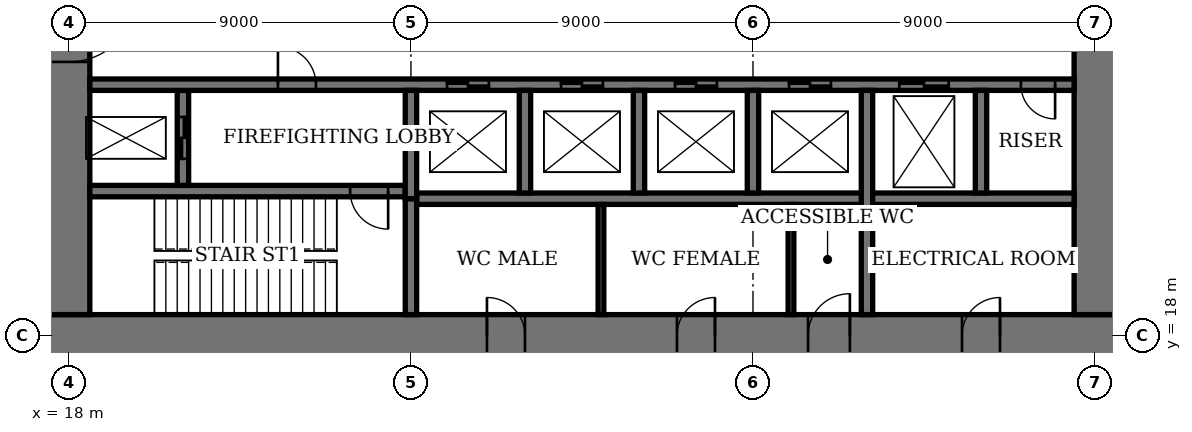
"""IFC4 building model, lengths in metres.
Left out: names, types, materials, properties, quantities, classifications, styles, units other than length and angle.
Written with IfcOpenShell. Run it as: python <this file> out.ifc"""

import sys

from ifc_helpers import new_model, si_unit, direction, frame, frame_2d, origin, place, context, subcontext, project, spatial, rectangle, extrude, element, fill, save


model = new_model("IFC4")
c1 = context("Model", 3, precision=1e-05, world=origin(), true_north=direction((0.0, 1.0)))
c2 = subcontext(c1, "Body", "Model", "MODEL_VIEW")
j1 = project(units=[si_unit("LENGTHUNIT", "METRE"), si_unit("PLANEANGLEUNIT", "RADIAN")], contexts=[c1])
p1 = place(None, origin())
s1 = spatial("IfcSite", under=j1, at=p1, CompositionType="ELEMENT")
p2 = place(p1, origin())
s2 = spatial("IfcBuilding", under=s1, at=p2, CompositionType="ELEMENT")
p3 = place(p2, frame((0.0, 0.0, -5.0)))
s3 = spatial("IfcBuildingStorey", under=s2, at=p3, CompositionType="ELEMENT", Elevation=-5.0)
p4 = place(p3, frame((17.45, 18.0, 0.0), z_axis=(0.0, 0.0, 1.0), x_axis=(1.0, 0.0, 0.0)))
e1 = element("IfcWall", 1, at=p4, inside=s3, PredefinedType="SHEAR", context=c2, shape_type="SweptSolid", body=[
    extrude(rectangle(XDim=28.1, YDim=1.1, at=frame_2d((14.05, 0.0))), origin(), (0.0, 0.0, 1.0), 5.0),
])
p5 = place(p4, frame((11.55, 0.0, 0.0)))
e2 = element("IfcOpeningElement", 2, at=p5, cuts=e1, PredefinedType="OPENING", context=c2, shape_type="SweptSolid", body=[
    extrude(rectangle(XDim=1.0, YDim=2.4, at=frame_2d((0.5, 1.2))), frame((0.0, 0.56, 0.0), z_axis=(0.0, -1.0, 0.0), x_axis=(1.0, 0.0, 0.0)), (0.0, 0.0, 1.0), 1.12),
])
p6 = place(p4, frame((16.55, 0.0, 0.0)))
e3 = element("IfcOpeningElement", 3, at=p6, cuts=e1, PredefinedType="OPENING", context=c2, shape_type="SweptSolid", body=[
    extrude(rectangle(XDim=1.0, YDim=2.4, at=frame_2d((0.5, 1.2))), frame((0.0, 0.56, 0.0), z_axis=(0.0, -1.0, 0.0), x_axis=(1.0, 0.0, 0.0)), (0.0, 0.0, 1.0), 1.12),
])
p7 = place(p4, frame((20.0, 0.0, 0.0)))
e4 = element("IfcOpeningElement", 4, at=p7, cuts=e1, PredefinedType="OPENING", context=c2, shape_type="SweptSolid", body=[
    extrude(rectangle(XDim=1.1, YDim=2.4, at=frame_2d((0.55, 1.2))), frame((0.0, 0.56, 0.0), z_axis=(0.0, -1.0, 0.0), x_axis=(1.0, 0.0, 0.0)), (0.0, 0.0, 1.0), 1.12),
])
p8 = place(p4, frame((24.05, 0.0, 0.0)))
e5 = element("IfcOpeningElement", 5, at=p8, cuts=e1, PredefinedType="OPENING", context=c2, shape_type="SweptSolid", body=[
    extrude(rectangle(XDim=1.0, YDim=2.4, at=frame_2d((0.5, 1.2))), frame((0.0, 0.56, 0.0), z_axis=(0.0, -1.0, 0.0), x_axis=(1.0, 0.0, 0.0)), (0.0, 0.0, 1.0), 1.12),
])
p9 = place(p3, frame((18.0, 35.45, 0.0), z_axis=(0.0, 0.0, 1.0), x_axis=(0.0, -1.0, 0.0)))
e6 = element("IfcWall", 6, at=p9, inside=s3, PredefinedType="SHEAR", context=c2, shape_type="SweptSolid", body=[
    extrude(rectangle(XDim=16.9, YDim=1.1, at=frame_2d((8.45, 0.0))), origin(), (0.0, 0.0, 1.0), 5.0),
])
p10 = place(p9, frame((8.45, 0.0, 0.0)))
e7 = element("IfcOpeningElement", 7, at=p10, cuts=e6, PredefinedType="OPENING", context=c2, shape_type="SweptSolid", body=[
    extrude(rectangle(XDim=1.8, YDim=2.4, at=frame_2d((0.9, 1.2))), frame((0.0, 0.56, 0.0), z_axis=(0.0, -1.0, 0.0), x_axis=(1.0, 0.0, 0.0)), (0.0, 0.0, 1.0), 1.12),
])
p11 = place(p3, frame((45.0, 18.55, 0.0), z_axis=(0.0, 0.0, 1.0), x_axis=(0.0, 1.0, 0.0)))
e8 = element("IfcWall", 8, at=p11, inside=s3, PredefinedType="SHEAR", context=c2, shape_type="SweptSolid", body=[
    extrude(rectangle(XDim=16.9, YDim=1.1, at=frame_2d((8.45, 0.0))), origin(), (0.0, 0.0, 1.0), 5.0),
])
p12 = place(p11, frame((8.45, 0.0, 0.0)))
e9 = element("IfcOpeningElement", 9, at=p12, cuts=e8, PredefinedType="OPENING", context=c2, shape_type="SweptSolid", body=[
    extrude(rectangle(XDim=1.8, YDim=2.4, at=frame_2d((0.9, 1.2))), frame((0.0, 0.56, 0.0), z_axis=(0.0, -1.0, 0.0), x_axis=(1.0, 0.0, 0.0)), (0.0, 0.0, 1.0), 1.12),
])
p13 = place(p3, frame((18.55, 21.8, 0.0), z_axis=(0.0, 0.0, 1.0), x_axis=(1.0, 0.0, 0.0)))
e10 = element("IfcWall", 10, at=p13, inside=s3, PredefinedType="SHEAR", context=c2, shape_type="SweptSolid", body=[
    extrude(rectangle(XDim=8.3, YDim=0.3, at=frame_2d((4.15, 0.0))), origin(), (0.0, 0.0, 1.0), 5.0),
])
p14 = place(p13, frame((6.85, 0.0, 0.0)))
e11 = element("IfcOpeningElement", 11, at=p14, cuts=e10, PredefinedType="OPENING", context=c2, shape_type="SweptSolid", body=[
    extrude(rectangle(XDim=1.0, YDim=2.4, at=frame_2d((0.5, 1.2))), frame((0.0, 0.16, 0.0), z_axis=(0.0, -1.0, 0.0), x_axis=(1.0, 0.0, 0.0)), (0.0, 0.0, 1.0), 0.32),
])
p15 = place(p3, frame((27.0, 18.55, 0.0), z_axis=(0.0, 0.0, 1.0), x_axis=(0.0, 1.0, 0.0)))
e12 = element("IfcWall", 12, at=p15, inside=s3, PredefinedType="SHEAR", context=c2, shape_type="SweptSolid", body=[
    extrude(rectangle(XDim=3.05, YDim=0.3, at=frame_2d((1.525, 0.0))), origin(), (0.0, 0.0, 1.0), 5.0),
])
p16 = place(p3, frame((21.0, 21.95, 0.0), z_axis=(0.0, 0.0, 1.0), x_axis=(0.0, 1.0, 0.0)))
e13 = element("IfcWall", 13, at=p16, inside=s3, PredefinedType="SHEAR", context=c2, shape_type="SweptSolid", body=[
    extrude(rectangle(XDim=2.5, YDim=0.3, at=frame_2d((1.25, 0.0))), origin(), (0.0, 0.0, 1.0), 5.0),
])
p17 = place(p16, frame((0.7, 0.0, 0.0)))
e14 = element("IfcOpeningElement", 14, at=p17, cuts=e13, PredefinedType="OPENING", context=c2, shape_type="SweptSolid", body=[
    extrude(rectangle(XDim=1.1, YDim=2.4, at=frame_2d((0.55, 1.2))), frame((0.0, 0.16, 0.0), z_axis=(0.0, -1.0, 0.0), x_axis=(1.0, 0.0, 0.0)), (0.0, 0.0, 1.0), 0.32),
])
p18 = place(p3, frame((18.55, 24.6, 0.0), z_axis=(0.0, 0.0, 1.0), x_axis=(1.0, 0.0, 0.0)))
e15 = element("IfcWall", 15, at=p18, inside=s3, PredefinedType="SHEAR", context=c2, shape_type="SweptSolid", body=[
    extrude(rectangle(XDim=25.9, YDim=0.3, at=frame_2d((12.95, 0.0))), origin(), (0.0, 0.0, 1.0), 5.0),
])
p19 = place(p18, frame((4.95, 0.0, 0.0)))
e16 = element("IfcOpeningElement", 16, at=p19, cuts=e15, PredefinedType="OPENING", context=c2, shape_type="SweptSolid", body=[
    extrude(rectangle(XDim=1.0, YDim=2.4, at=frame_2d((0.5, 1.2))), frame((0.0, 0.16, 0.0), z_axis=(0.0, -1.0, 0.0), x_axis=(1.0, 0.0, 0.0)), (0.0, 0.0, 1.0), 0.32),
])
p20 = place(p18, frame((24.5, 0.0, 0.0)))
e17 = element("IfcOpeningElement", 17, at=p20, cuts=e15, PredefinedType="OPENING", context=c2, shape_type="SweptSolid", body=[
    extrude(rectangle(XDim=0.9, YDim=2.1, at=frame_2d((0.45, 1.05))), frame((0.0, 0.16, 0.0), z_axis=(0.0, -1.0, 0.0), x_axis=(1.0, 0.0, 0.0)), (0.0, 0.0, 1.0), 0.32),
])
p21 = place(p18, frame((9.4, 0.0, 0.0)))
e18 = element("IfcOpeningElement", 18, at=p21, cuts=e15, PredefinedType="OPENING", context=c2, shape_type="SweptSolid", body=[
    extrude(rectangle(XDim=1.1, YDim=2.4, at=frame_2d((0.55, 1.2))), frame((0.0, 0.16, 0.0), z_axis=(0.0, -1.0, 0.0), x_axis=(1.0, 0.0, 0.0)), (0.0, 0.0, 1.0), 0.32),
])
p22 = place(p18, frame((12.4, 0.0, 0.0)))
e19 = element("IfcOpeningElement", 19, at=p22, cuts=e15, PredefinedType="OPENING", context=c2, shape_type="SweptSolid", body=[
    extrude(rectangle(XDim=1.1, YDim=2.4, at=frame_2d((0.55, 1.2))), frame((0.0, 0.16, 0.0), z_axis=(0.0, -1.0, 0.0), x_axis=(1.0, 0.0, 0.0)), (0.0, 0.0, 1.0), 0.32),
])
p23 = place(p18, frame((15.4, 0.0, 0.0)))
e20 = element("IfcOpeningElement", 20, at=p23, cuts=e15, PredefinedType="OPENING", context=c2, shape_type="SweptSolid", body=[
    extrude(rectangle(XDim=1.1, YDim=2.4, at=frame_2d((0.55, 1.2))), frame((0.0, 0.16, 0.0), z_axis=(0.0, -1.0, 0.0), x_axis=(1.0, 0.0, 0.0)), (0.0, 0.0, 1.0), 0.32),
])
p24 = place(p18, frame((18.4, 0.0, 0.0)))
e21 = element("IfcOpeningElement", 21, at=p24, cuts=e15, PredefinedType="OPENING", context=c2, shape_type="SweptSolid", body=[
    extrude(rectangle(XDim=1.1, YDim=2.4, at=frame_2d((0.55, 1.2))), frame((0.0, 0.16, 0.0), z_axis=(0.0, -1.0, 0.0), x_axis=(1.0, 0.0, 0.0)), (0.0, 0.0, 1.0), 0.32),
])
p25 = place(p18, frame((21.3, 0.0, 0.0)))
e22 = element("IfcOpeningElement", 22, at=p25, cuts=e15, PredefinedType="OPENING", context=c2, shape_type="SweptSolid", body=[
    extrude(rectangle(XDim=1.3, YDim=2.4, at=frame_2d((0.65, 1.2))), frame((0.0, 0.16, 0.0), z_axis=(0.0, -1.0, 0.0), x_axis=(1.0, 0.0, 0.0)), (0.0, 0.0, 1.0), 0.32),
])
p26 = place(p3, frame((27.15, 21.6, 0.0), z_axis=(0.0, 0.0, 1.0), x_axis=(1.0, 0.0, 0.0)))
e23 = element("IfcWall", 23, at=p26, inside=s3, PredefinedType="SHEAR", context=c2, shape_type="SweptSolid", body=[
    extrude(rectangle(XDim=17.3, YDim=0.3, at=frame_2d((8.65, 0.0))), origin(), (0.0, 0.0, 1.0), 5.0),
])
for number, where, z_axis, x_axis in (
    (24, (30.0, 21.75, 0.0), (0.0, 0.0, 1.0), (0.0, 1.0, 0.0)),
    (25, (33.0, 21.75, 0.0), (0.0, 0.0, 1.0), (0.0, 1.0, 0.0)),
    (26, (36.0, 21.75, 0.0), (0.0, 0.0, 1.0), (0.0, 1.0, 0.0)),
):
    element("IfcWall", number, at=place(p3, frame(where, z_axis=z_axis, x_axis=x_axis)), inside=s3, PredefinedType="SHEAR", context=c2, shape_type="SweptSolid", body=[
        extrude(rectangle(XDim=2.7, YDim=0.3, at=frame_2d((1.35, 0.0))), origin(), (0.0, 0.0, 1.0), 5.0),
    ])
p27 = place(p3, frame((39.0, 18.55, 0.0), z_axis=(0.0, 0.0, 1.0), x_axis=(0.0, 1.0, 0.0)))
e27 = element("IfcWall", 27, at=p27, inside=s3, PredefinedType="SHEAR", context=c2, shape_type="SweptSolid", body=[
    extrude(rectangle(XDim=5.9, YDim=0.3, at=frame_2d((2.95, 0.0))), origin(), (0.0, 0.0, 1.0), 5.0),
])
p28 = place(p3, frame((42.0, 21.75, 0.0), z_axis=(0.0, 0.0, 1.0), x_axis=(0.0, 1.0, 0.0)))
e28 = element("IfcWall", 28, at=p28, inside=s3, PredefinedType="SHEAR", context=c2, shape_type="SweptSolid", body=[
    extrude(rectangle(XDim=2.7, YDim=0.3, at=frame_2d((1.35, 0.0))), origin(), (0.0, 0.0, 1.0), 5.0),
])
p29 = place(p3, frame((27.0, 21.6, 0.0), z_axis=(0.0, 0.0, 1.0), x_axis=(0.0, 1.0, 0.0)))
e29 = element("IfcWall", 29, at=p29, inside=s3, PredefinedType="SHEAR", context=c2, shape_type="SweptSolid", body=[
    extrude(rectangle(XDim=2.85, YDim=0.3, at=frame_2d((1.425, 0.0))), origin(), (0.0, 0.0, 1.0), 5.0),
])
for number, where, z_axis, x_axis in (
    (30, (32.0, 18.55, 0.0), (0.0, 0.0, 1.0), (0.0, 1.0, 0.0)),
    (31, (37.0, 18.55, 0.0), (0.0, 0.0, 1.0), (0.0, 1.0, 0.0)),
):
    element("IfcWall", number, at=place(p3, frame(where, z_axis=z_axis, x_axis=x_axis)), inside=s3, PredefinedType="PARTITIONING", context=c2, shape_type="SweptSolid", body=[
        extrude(rectangle(XDim=2.9, YDim=0.15, at=frame_2d((1.45, 0.0))), origin(), (0.0, 0.0, 1.0), 4.7),
    ])
p30 = place(p10, origin())
e32 = element("IfcDoor", 32, at=p30, inside=s3, OperationType="DOUBLE_DOOR_DOUBLE_SWING", PredefinedType="DOOR", context=c2, shape_type="SweptSolid", body=[
    extrude(rectangle(XDim=1.8, YDim=2.4, at=frame_2d((0.9, 1.2))), frame((0.0, 0.03, 0.0), z_axis=(0.0, -1.0, 0.0), x_axis=(1.0, 0.0, 0.0)), (0.0, 0.0, 1.0), 0.06),
    extrude(rectangle(XDim=0.04, YDim=2.4, at=frame_2d((0.02, 1.2))), frame((0.0, 0.55, 0.0), z_axis=(0.0, -1.0, 0.0), x_axis=(1.0, 0.0, 0.0)), (0.0, 0.0, 1.0), 1.1),
    extrude(rectangle(XDim=0.04, YDim=2.4, at=frame_2d((1.78, 1.2))), frame((0.0, 0.55, 0.0), z_axis=(0.0, -1.0, 0.0), x_axis=(1.0, 0.0, 0.0)), (0.0, 0.0, 1.0), 1.1),
    extrude(rectangle(XDim=1.8, YDim=0.04, at=frame_2d((0.9, 2.38))), frame((0.0, 0.55, 0.0), z_axis=(0.0, -1.0, 0.0), x_axis=(1.0, 0.0, 0.0)), (0.0, 0.0, 1.0), 1.1),
])
fill(e7, e32)
p31 = place(p5, origin())
e33 = element("IfcDoor", 33, at=p31, inside=s3, OperationType="SINGLE_SWING_RIGHT", PredefinedType="DOOR", context=c2, shape_type="SweptSolid", body=[
    extrude(rectangle(XDim=1.0, YDim=2.4, at=frame_2d((0.5, 1.2))), frame((0.0, 0.025, 0.0), z_axis=(0.0, -1.0, 0.0), x_axis=(1.0, 0.0, 0.0)), (0.0, 0.0, 1.0), 0.05),
    extrude(rectangle(XDim=0.04, YDim=2.4, at=frame_2d((0.02, 1.2))), frame((0.0, 0.4, 0.0), z_axis=(0.0, -1.0, 0.0), x_axis=(1.0, 0.0, 0.0)), (0.0, 0.0, 1.0), 0.8),
    extrude(rectangle(XDim=0.04, YDim=2.4, at=frame_2d((0.98, 1.2))), frame((0.0, 0.4, 0.0), z_axis=(0.0, -1.0, 0.0), x_axis=(1.0, 0.0, 0.0)), (0.0, 0.0, 1.0), 0.8),
    extrude(rectangle(XDim=1.0, YDim=0.04, at=frame_2d((0.5, 2.38))), frame((0.0, 0.4, 0.0), z_axis=(0.0, -1.0, 0.0), x_axis=(1.0, 0.0, 0.0)), (0.0, 0.0, 1.0), 0.8),
])
fill(e2, e33)
p32 = place(p6, origin())
e34 = element("IfcDoor", 34, at=p32, inside=s3, OperationType="SINGLE_SWING_LEFT", PredefinedType="DOOR", context=c2, shape_type="SweptSolid", body=[
    extrude(rectangle(XDim=1.0, YDim=2.4, at=frame_2d((0.5, 1.2))), frame((0.0, 0.025, 0.0), z_axis=(0.0, -1.0, 0.0), x_axis=(1.0, 0.0, 0.0)), (0.0, 0.0, 1.0), 0.05),
    extrude(rectangle(XDim=0.04, YDim=2.4, at=frame_2d((0.02, 1.2))), frame((0.0, 0.4, 0.0), z_axis=(0.0, -1.0, 0.0), x_axis=(1.0, 0.0, 0.0)), (0.0, 0.0, 1.0), 0.8),
    extrude(rectangle(XDim=0.04, YDim=2.4, at=frame_2d((0.98, 1.2))), frame((0.0, 0.4, 0.0), z_axis=(0.0, -1.0, 0.0), x_axis=(1.0, 0.0, 0.0)), (0.0, 0.0, 1.0), 0.8),
    extrude(rectangle(XDim=1.0, YDim=0.04, at=frame_2d((0.5, 2.38))), frame((0.0, 0.4, 0.0), z_axis=(0.0, -1.0, 0.0), x_axis=(1.0, 0.0, 0.0)), (0.0, 0.0, 1.0), 0.8),
])
fill(e3, e34)
p33 = place(p7, origin())
e35 = element("IfcDoor", 35, at=p33, inside=s3, OperationType="SINGLE_SWING_LEFT", PredefinedType="DOOR", context=c2, shape_type="SweptSolid", body=[
    extrude(rectangle(XDim=1.1, YDim=2.4, at=frame_2d((0.55, 1.2))), frame((0.0, 0.025, 0.0), z_axis=(0.0, -1.0, 0.0), x_axis=(1.0, 0.0, 0.0)), (0.0, 0.0, 1.0), 0.05),
    extrude(rectangle(XDim=0.04, YDim=2.4, at=frame_2d((0.02, 1.2))), frame((0.0, 0.44, 0.0), z_axis=(0.0, -1.0, 0.0), x_axis=(1.0, 0.0, 0.0)), (0.0, 0.0, 1.0), 0.88),
    extrude(rectangle(XDim=0.04, YDim=2.4, at=frame_2d((1.08, 1.2))), frame((0.0, 0.44, 0.0), z_axis=(0.0, -1.0, 0.0), x_axis=(1.0, 0.0, 0.0)), (0.0, 0.0, 1.0), 0.88),
    extrude(rectangle(XDim=1.1, YDim=0.04, at=frame_2d((0.55, 2.38))), frame((0.0, 0.44, 0.0), z_axis=(0.0, -1.0, 0.0), x_axis=(1.0, 0.0, 0.0)), (0.0, 0.0, 1.0), 0.88),
])
fill(e4, e35)
p34 = place(p8, origin())
e36 = element("IfcDoor", 36, at=p34, inside=s3, OperationType="SINGLE_SWING_LEFT", PredefinedType="DOOR", context=c2, shape_type="SweptSolid", body=[
    extrude(rectangle(XDim=1.0, YDim=2.4, at=frame_2d((0.5, 1.2))), frame((0.0, 0.025, 0.0), z_axis=(0.0, -1.0, 0.0), x_axis=(1.0, 0.0, 0.0)), (0.0, 0.0, 1.0), 0.05),
    extrude(rectangle(XDim=0.04, YDim=2.4, at=frame_2d((0.02, 1.2))), frame((0.0, 0.4, 0.0), z_axis=(0.0, -1.0, 0.0), x_axis=(1.0, 0.0, 0.0)), (0.0, 0.0, 1.0), 0.8),
    extrude(rectangle(XDim=0.04, YDim=2.4, at=frame_2d((0.98, 1.2))), frame((0.0, 0.4, 0.0), z_axis=(0.0, -1.0, 0.0), x_axis=(1.0, 0.0, 0.0)), (0.0, 0.0, 1.0), 0.8),
    extrude(rectangle(XDim=1.0, YDim=0.04, at=frame_2d((0.5, 2.38))), frame((0.0, 0.4, 0.0), z_axis=(0.0, -1.0, 0.0), x_axis=(1.0, 0.0, 0.0)), (0.0, 0.0, 1.0), 0.8),
])
fill(e5, e36)
p35 = place(p14, origin())
e37 = element("IfcDoor", 37, at=p35, inside=s3, OperationType="SINGLE_SWING_RIGHT", PredefinedType="DOOR", context=c2, shape_type="SweptSolid", body=[
    extrude(rectangle(XDim=1.0, YDim=2.4, at=frame_2d((0.5, 1.2))), frame((0.0, 0.03, 0.0), z_axis=(0.0, -1.0, 0.0), x_axis=(1.0, 0.0, 0.0)), (0.0, 0.0, 1.0), 0.06),
])
fill(e11, e37)
p36 = place(p19, origin())
e38 = element("IfcDoor", 38, at=p36, inside=s3, OperationType="SINGLE_SWING_RIGHT", PredefinedType="DOOR", context=c2, shape_type="SweptSolid", body=[
    extrude(rectangle(XDim=1.0, YDim=2.4, at=frame_2d((0.5, 1.2))), frame((0.0, 0.03, 0.0), z_axis=(0.0, -1.0, 0.0), x_axis=(1.0, 0.0, 0.0)), (0.0, 0.0, 1.0), 0.06),
])
fill(e16, e38)
p37 = place(p20, origin())
e39 = element("IfcDoor", 39, at=p37, inside=s3, OperationType="SINGLE_SWING_RIGHT", PredefinedType="DOOR", context=c2, shape_type="SweptSolid", body=[
    extrude(rectangle(XDim=0.9, YDim=2.1, at=frame_2d((0.45, 1.05))), frame((0.0, 0.03, 0.0), z_axis=(0.0, -1.0, 0.0), x_axis=(1.0, 0.0, 0.0)), (0.0, 0.0, 1.0), 0.06),
])
fill(e17, e39)
p38 = place(p21, origin())
e40 = element("IfcDoor", 40, at=p38, inside=s3, OperationType="DOUBLE_DOOR_SLIDING", PredefinedType="DOOR", context=c2, shape_type="SweptSolid", body=[
    extrude(rectangle(XDim=1.1, YDim=2.4, at=frame_2d((0.55, 1.2))), frame((0.0, 0.02, 0.0), z_axis=(0.0, -1.0, 0.0), x_axis=(1.0, 0.0, 0.0)), (0.0, 0.0, 1.0), 0.04),
])
fill(e18, e40)
p39 = place(p22, origin())
e41 = element("IfcDoor", 41, at=p39, inside=s3, OperationType="DOUBLE_DOOR_SLIDING", PredefinedType="DOOR", context=c2, shape_type="SweptSolid", body=[
    extrude(rectangle(XDim=1.1, YDim=2.4, at=frame_2d((0.55, 1.2))), frame((0.0, 0.02, 0.0), z_axis=(0.0, -1.0, 0.0), x_axis=(1.0, 0.0, 0.0)), (0.0, 0.0, 1.0), 0.04),
])
fill(e19, e41)
p40 = place(p23, origin())
e42 = element("IfcDoor", 42, at=p40, inside=s3, OperationType="DOUBLE_DOOR_SLIDING", PredefinedType="DOOR", context=c2, shape_type="SweptSolid", body=[
    extrude(rectangle(XDim=1.1, YDim=2.4, at=frame_2d((0.55, 1.2))), frame((0.0, 0.02, 0.0), z_axis=(0.0, -1.0, 0.0), x_axis=(1.0, 0.0, 0.0)), (0.0, 0.0, 1.0), 0.04),
])
fill(e20, e42)
p41 = place(p24, origin())
e43 = element("IfcDoor", 43, at=p41, inside=s3, OperationType="DOUBLE_DOOR_SLIDING", PredefinedType="DOOR", context=c2, shape_type="SweptSolid", body=[
    extrude(rectangle(XDim=1.1, YDim=2.4, at=frame_2d((0.55, 1.2))), frame((0.0, 0.02, 0.0), z_axis=(0.0, -1.0, 0.0), x_axis=(1.0, 0.0, 0.0)), (0.0, 0.0, 1.0), 0.04),
])
fill(e21, e43)
p42 = place(p25, origin())
e44 = element("IfcDoor", 44, at=p42, inside=s3, OperationType="DOUBLE_DOOR_SLIDING", PredefinedType="DOOR", context=c2, shape_type="SweptSolid", body=[
    extrude(rectangle(XDim=1.3, YDim=2.4, at=frame_2d((0.65, 1.2))), frame((0.0, 0.02, 0.0), z_axis=(0.0, -1.0, 0.0), x_axis=(1.0, 0.0, 0.0)), (0.0, 0.0, 1.0), 0.04),
])
fill(e22, e44)
p43 = place(p17, origin())
e45 = element("IfcDoor", 45, at=p43, inside=s3, OperationType="DOUBLE_DOOR_SLIDING", PredefinedType="DOOR", context=c2, shape_type="SweptSolid", body=[
    extrude(rectangle(XDim=1.1, YDim=2.4, at=frame_2d((0.55, 1.2))), frame((0.0, 0.03, 0.0), z_axis=(0.0, -1.0, 0.0), x_axis=(1.0, 0.0, 0.0)), (0.0, 0.0, 1.0), 0.06),
])
fill(e14, e45)
save(model, sys.argv[1])
